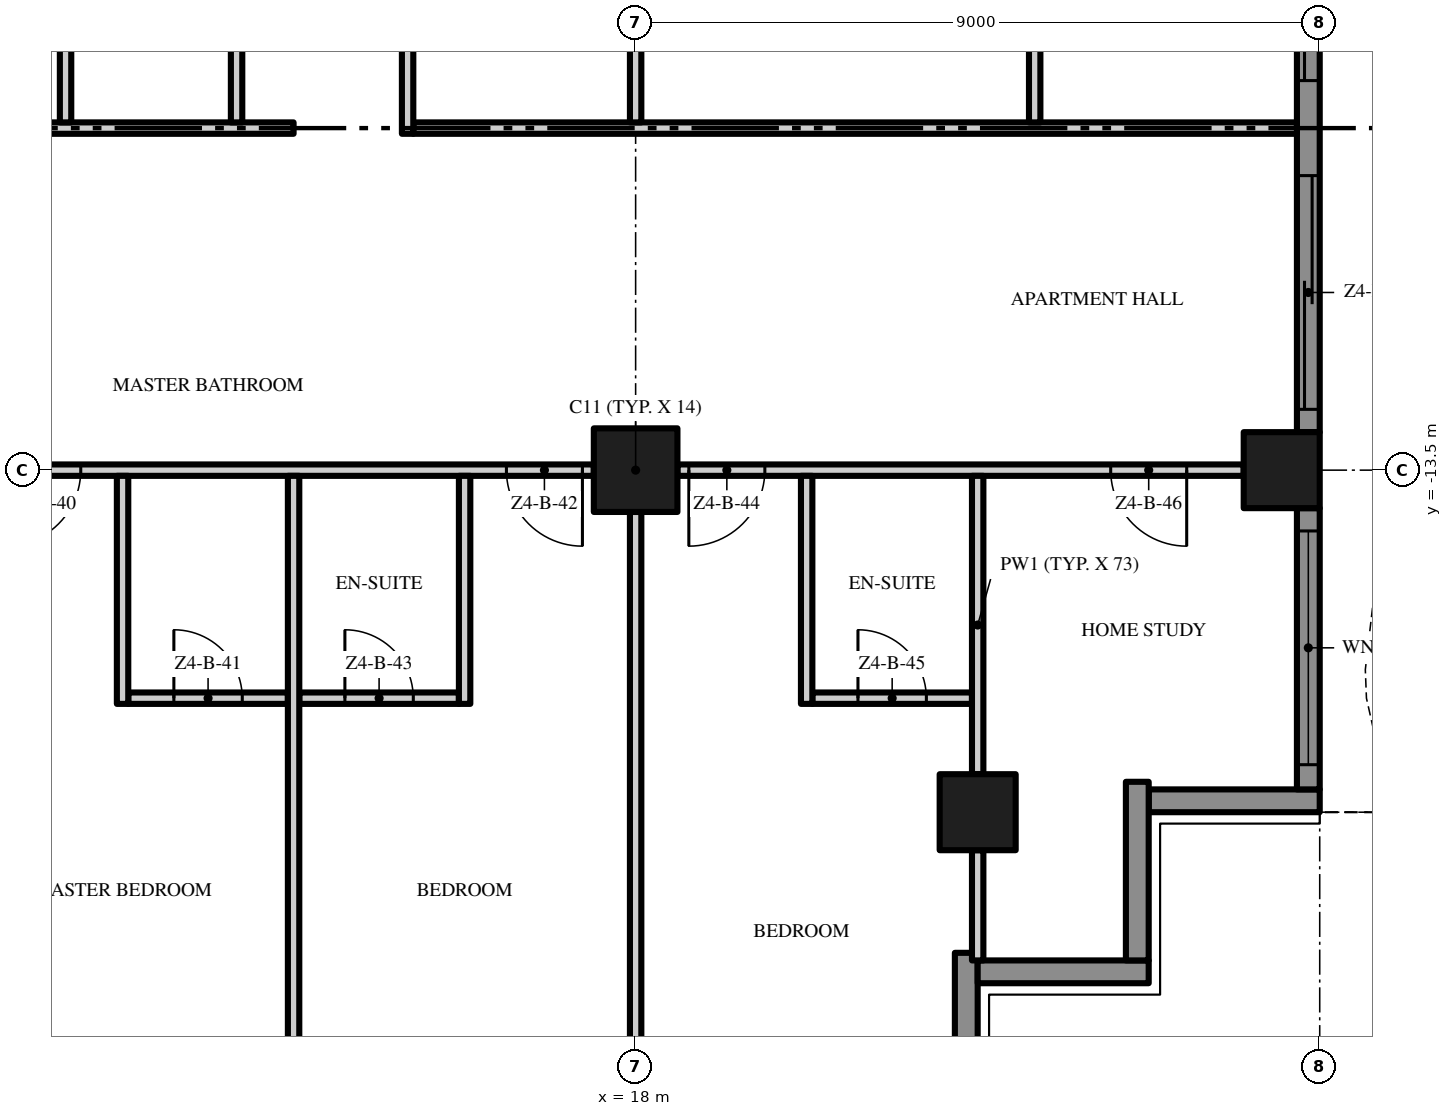
"""IFC4 building model, lengths in metres.
Left out: names, types, materials, properties, quantities, classifications, styles, units other than length and angle.
Written with IfcOpenShell. Run it as: python <this file> out.ifc"""

import sys

from ifc_helpers import new_model, si_unit, direction, frame, frame_2d, origin, origin_2d, place, context, subcontext, project, spatial, polyline, rectangle, outline, extrude, element, fill, save


model = new_model("IFC4")
c1 = context("Model", 3, precision=1e-05, world=origin(), true_north=direction((0.0, 1.0)))
c2 = subcontext(c1, "Body", "Model", "MODEL_VIEW")
j1 = project(units=[si_unit("LENGTHUNIT", "METRE"), si_unit("PLANEANGLEUNIT", "RADIAN")], contexts=[c1])
p1 = place(None, origin())
s1 = spatial("IfcSite", under=j1, at=p1, CompositionType="ELEMENT")
p2 = place(p1, origin())
s2 = spatial("IfcBuilding", under=s1, at=p2, CompositionType="ELEMENT")
p3 = place(p2, frame((0.0, 0.0, 199.6)))
s3 = spatial("IfcBuildingStorey", under=s2, at=p3, CompositionType="ELEMENT", Elevation=199.6)
p4 = place(p3, frame((18.0, -13.5, 0.0), z_axis=(0.0, 0.0, 1.0), x_axis=(1.0, 0.0, 0.0)))
e1 = element("IfcColumn", 1, at=p4, inside=s3, PredefinedType="COLUMN", context=c2, shape_type="SweptSolid", body=[
    extrude(rectangle(XDim=1.1, YDim=1.1, at=origin_2d()), origin(), (0.0, 0.0, 1.0), 3.5),
])
for number, where, z_axis, x_axis in (
    (2, (26.5, -13.5, 0.0), (0.0, 0.0, 1.0), (1.0, 0.0, 0.0)),
    (3, (22.5, -18.0, 0.0), (0.0, 0.0, 1.0), (1.0, 0.0, 0.0)),
):
    element("IfcColumn", number, at=place(p3, frame(where, z_axis=z_axis, x_axis=x_axis)), inside=s3, PredefinedType="COLUMN", context=c2, shape_type="SweptSolid", body=[
        extrude(rectangle(XDim=1.0, YDim=1.0, at=origin_2d()), origin(), (0.0, 0.0, 1.0), 3.5),
    ])
p5 = place(p3, frame((22.35, -19.85, 0.0), z_axis=(0.0, 0.0, 1.0), x_axis=(0.0, -1.0, 0.0)))
e4 = element("IfcWall", 4, at=p5, inside=s3, PredefinedType="SOLIDWALL", context=c2, shape_type="SweptSolid", body=[
    extrude(rectangle(XDim=2.35, YDim=0.3, at=frame_2d((1.175, 0.0))), origin(), (0.0, 0.0, 1.0), 3.5),
])
p6 = place(p3, frame((24.75, -20.1, 0.0), z_axis=(0.0, 0.0, 1.0), x_axis=(-1.0, 0.0, 0.0)))
e5 = element("IfcWall", 5, at=p6, inside=s3, PredefinedType="SOLIDWALL", context=c2, shape_type="SweptSolid", body=[
    extrude(rectangle(XDim=2.25, YDim=0.3, at=frame_2d((1.125, 0.0))), origin(), (0.0, 0.0, 1.0), 3.5),
])
p7 = place(p3, frame((24.6, -17.6, 0.0), z_axis=(0.0, 0.0, 1.0), x_axis=(0.0, -1.0, 0.0)))
e6 = element("IfcWall", 6, at=p7, inside=s3, PredefinedType="SOLIDWALL", context=c2, shape_type="SweptSolid", body=[
    extrude(rectangle(XDim=2.35, YDim=0.3, at=frame_2d((1.175, 0.0))), origin(), (0.0, 0.0, 1.0), 3.5),
])
p8 = place(p3, frame((27.0, -17.85, 0.0), z_axis=(0.0, 0.0, 1.0), x_axis=(-1.0, 0.0, 0.0)))
e7 = element("IfcWall", 7, at=p8, inside=s3, PredefinedType="SOLIDWALL", context=c2, shape_type="SweptSolid", body=[
    extrude(rectangle(XDim=2.25, YDim=0.3, at=frame_2d((1.125, 0.0))), origin(), (0.0, 0.0, 1.0), 3.5),
])
p9 = place(p3, frame((26.85, -14.0, 0.0), z_axis=(0.0, 0.0, 1.0), x_axis=(0.0, -1.0, 0.0)))
e8 = element("IfcWall", 8, at=p9, inside=s3, PredefinedType="SOLIDWALL", context=c2, shape_type="SweptSolid", body=[
    extrude(rectangle(XDim=3.7, YDim=0.3, at=frame_2d((1.85, 0.0))), origin(), (0.0, 0.0, 1.0), 3.5),
])
p10 = place(p9, frame((0.3, 0.0, 0.45)))
e9 = element("IfcOpeningElement", 9, at=p10, cuts=e8, PredefinedType="OPENING", context=c2, shape_type="SweptSolid", body=[
    extrude(rectangle(XDim=3.075, YDim=2.65, at=frame_2d((1.538, 1.325))), frame((0.0, 0.16, 0.0), z_axis=(0.0, -1.0, 0.0), x_axis=(1.0, 0.0, 0.0)), (0.0, 0.0, 1.0), 0.32),
])
p11 = place(p3, frame((26.85, -5.0, 0.0), z_axis=(0.0, 0.0, 1.0), x_axis=(0.0, -1.0, 0.0)))
e10 = element("IfcWall", 10, at=p11, inside=s3, PredefinedType="SOLIDWALL", context=c2, shape_type="SweptSolid", body=[
    extrude(rectangle(XDim=8.0, YDim=0.3, at=frame_2d((4.0, 0.0))), origin(), (0.0, 0.0, 1.0), 3.5),
])
p12 = place(p11, frame((4.625, 0.0, 0.0)))
e11 = element("IfcOpeningElement", 11, at=p12, cuts=e10, PredefinedType="OPENING", context=c2, shape_type="SweptSolid", body=[
    extrude(rectangle(XDim=3.075, YDim=2.4, at=frame_2d((1.538, 1.2))), frame((0.0, 0.16, 0.0), z_axis=(0.0, -1.0, 0.0), x_axis=(1.0, 0.0, 0.0)), (0.0, 0.0, 1.0), 0.32),
])
p13 = place(p11, frame((0.3, 0.0, 0.0)))
e12 = element("IfcOpeningElement", 12, at=p13, cuts=e10, PredefinedType="OPENING", context=c2, shape_type="SweptSolid", body=[
    extrude(rectangle(XDim=3.075, YDim=2.4, at=frame_2d((1.538, 1.2))), frame((0.0, 0.16, 0.0), z_axis=(0.0, -1.0, 0.0), x_axis=(1.0, 0.0, 0.0)), (0.0, 0.0, 1.0), 0.32),
])
p14 = place(p3, origin())
e13 = element("IfcWall", 13, at=p14, inside=s3, PredefinedType="USERDEFINED", context=c2, shape_type="SweptSolid", body=[
    extrude(outline(polyline([(27.951, -18.0), (27.615, -16.5), (27.6, -16.125), (27.731, -15.0), (28.255, -13.5), (28.988, -12.0), (29.649, -10.5), (29.985, -9.0), (30.0, -8.625), (29.869, -7.5), (29.345, -6.0), (28.612, -4.5), (27.951, -3.0), (27.615, -1.5), (27.6, -1.125), (27.731, 0.0), (28.255, 1.5), (28.988, 3.0), (29.649, 4.5), (29.985, 6.0), (30.0, 6.375), (29.869, 7.5), (29.345, 9.0), (28.612, 10.5), (27.951, 12.0), (27.615, 13.5), (27.6, 13.875), (27.731, 15.0), (28.255, 16.5), (28.988, 18.0), (28.763, 18.11), (28.024, 16.596), (27.486, 15.056), (27.349, 13.885), (27.366, 13.467), (27.713, 11.921), (28.385, 10.395), (29.114, 8.904), (29.624, 7.444), (29.749, 6.365), (29.736, 6.033), (29.41, 4.579), (28.761, 3.105), (28.024, 1.596), (27.486, 0.056), (27.349, -1.115), (27.366, -1.533), (27.713, -3.079), (28.385, -4.605), (29.114, -6.096), (29.624, -7.556), (29.749, -8.635), (29.736, -8.967), (29.41, -10.421), (28.761, -11.895), (28.024, -13.404), (27.486, -14.944), (27.349, -16.115), (27.366, -16.533), (27.708, -18.055), (27.951, -18.0)])), origin(), (0.0, 0.0, 1.0), 0.9),
])
p15 = place(p3, frame((11.325, -16.5, 0.0), z_axis=(0.0, 0.0, 1.0), x_axis=(1.0, 0.0, 0.0)))
e14 = element("IfcWall", 14, at=p15, inside=s3, PredefinedType="PARTITIONING", context=c2, shape_type="SweptSolid", body=[
    extrude(rectangle(XDim=2.1, YDim=0.15, at=frame_2d((1.05, 0.0))), origin(), (0.0, 0.0, 1.0), 3.5),
])
p16 = place(p15, frame((0.6, 0.0, 0.0)))
e15 = element("IfcOpeningElement", 15, at=p16, cuts=e14, PredefinedType="OPENING", context=c2, shape_type="SweptSolid", body=[
    extrude(rectangle(XDim=0.9, YDim=2.1, at=frame_2d((0.45, 1.05))), frame((0.0, 0.085, 0.0), z_axis=(0.0, -1.0, 0.0), x_axis=(1.0, 0.0, 0.0)), (0.0, 0.0, 1.0), 0.17),
])
p17 = place(p3, frame((13.575, -16.5, 0.0), z_axis=(0.0, 0.0, 1.0), x_axis=(1.0, 0.0, 0.0)))
e16 = element("IfcWall", 16, at=p17, inside=s3, PredefinedType="PARTITIONING", context=c2, shape_type="SweptSolid", body=[
    extrude(rectangle(XDim=2.1, YDim=0.15, at=frame_2d((1.05, 0.0))), origin(), (0.0, 0.0, 1.0), 3.5),
])
p18 = place(p17, frame((0.6, 0.0, 0.0)))
e17 = element("IfcOpeningElement", 17, at=p18, cuts=e16, PredefinedType="OPENING", context=c2, shape_type="SweptSolid", body=[
    extrude(rectangle(XDim=0.9, YDim=2.1, at=frame_2d((0.45, 1.05))), frame((0.0, 0.085, 0.0), z_axis=(0.0, -1.0, 0.0), x_axis=(1.0, 0.0, 0.0)), (0.0, 0.0, 1.0), 0.17),
])
p19 = place(p3, frame((20.325, -16.5, 0.0), z_axis=(0.0, 0.0, 1.0), x_axis=(1.0, 0.0, 0.0)))
e18 = element("IfcWall", 18, at=p19, inside=s3, PredefinedType="PARTITIONING", context=c2, shape_type="SweptSolid", body=[
    extrude(rectangle(XDim=2.1, YDim=0.15, at=frame_2d((1.05, 0.0))), origin(), (0.0, 0.0, 1.0), 3.5),
])
p20 = place(p19, frame((0.6, 0.0, 0.0)))
e19 = element("IfcOpeningElement", 19, at=p20, cuts=e18, PredefinedType="OPENING", context=c2, shape_type="SweptSolid", body=[
    extrude(rectangle(XDim=0.9, YDim=2.1, at=frame_2d((0.45, 1.05))), frame((0.0, 0.085, 0.0), z_axis=(0.0, -1.0, 0.0), x_axis=(1.0, 0.0, 0.0)), (0.0, 0.0, 1.0), 0.17),
])
p21 = place(p3, frame((17.45, -13.5, 0.0), z_axis=(0.0, 0.0, 1.0), x_axis=(-1.0, 0.0, 0.0)))
e20 = element("IfcWall", 20, at=p21, inside=s3, PredefinedType="PARTITIONING", context=c2, shape_type="SweptSolid", body=[
    extrude(rectangle(XDim=7.9, YDim=0.15, at=frame_2d((3.95, 0.0))), origin(), (0.0, 0.0, 1.0), 3.5),
])
p22 = place(p21, frame((6.75, 0.0, 0.0)))
e21 = element("IfcOpeningElement", 21, at=p22, cuts=e20, PredefinedType="OPENING", context=c2, shape_type="SweptSolid", body=[
    extrude(rectangle(XDim=1.0, YDim=2.4, at=frame_2d((0.5, 1.2))), frame((0.0, 0.085, 0.0), z_axis=(0.0, -1.0, 0.0), x_axis=(1.0, 0.0, 0.0)), (0.0, 0.0, 1.0), 0.17),
])
p23 = place(p21, frame((0.15, 0.0, 0.0)))
e22 = element("IfcOpeningElement", 22, at=p23, cuts=e20, PredefinedType="OPENING", context=c2, shape_type="SweptSolid", body=[
    extrude(rectangle(XDim=1.0, YDim=2.4, at=frame_2d((0.5, 1.2))), frame((0.0, 0.085, 0.0), z_axis=(0.0, -1.0, 0.0), x_axis=(1.0, 0.0, 0.0)), (0.0, 0.0, 1.0), 0.17),
])
p24 = place(p3, frame((26.0, -13.5, 0.0), z_axis=(0.0, 0.0, 1.0), x_axis=(-1.0, 0.0, 0.0)))
e23 = element("IfcWall", 23, at=p24, inside=s3, PredefinedType="PARTITIONING", context=c2, shape_type="SweptSolid", body=[
    extrude(rectangle(XDim=7.45, YDim=0.15, at=frame_2d((3.725, 0.0))), origin(), (0.0, 0.0, 1.0), 3.5),
])
p25 = place(p24, frame((6.3, 0.0, 0.0)))
e24 = element("IfcOpeningElement", 24, at=p25, cuts=e23, PredefinedType="OPENING", context=c2, shape_type="SweptSolid", body=[
    extrude(rectangle(XDim=1.0, YDim=2.4, at=frame_2d((0.5, 1.2))), frame((0.0, 0.085, 0.0), z_axis=(0.0, -1.0, 0.0), x_axis=(1.0, 0.0, 0.0)), (0.0, 0.0, 1.0), 0.17),
])
p26 = place(p24, frame((0.75, 0.0, 0.0)))
e25 = element("IfcOpeningElement", 25, at=p26, cuts=e23, PredefinedType="OPENING", context=c2, shape_type="SweptSolid", body=[
    extrude(rectangle(XDim=1.0, YDim=2.4, at=frame_2d((0.5, 1.2))), frame((0.0, 0.085, 0.0), z_axis=(0.0, -1.0, 0.0), x_axis=(1.0, 0.0, 0.0)), (0.0, 0.0, 1.0), 0.17),
])
p27 = place(p3, frame((0.1, -9.0, 0.0), z_axis=(0.0, 0.0, 1.0), x_axis=(1.0, 0.0, 0.0)))
e26 = element("IfcWall", 26, at=p27, inside=s3, PredefinedType="PARTITIONING", context=c2, shape_type="SweptSolid", body=[
    extrude(rectangle(XDim=13.4, YDim=0.15, at=frame_2d((6.7, 0.0))), origin(), (0.0, 0.0, 1.0), 3.5),
])
p28 = place(p27, frame((6.9, 0.0, 0.0)))
e27 = element("IfcOpeningElement", 27, at=p28, cuts=e26, PredefinedType="OPENING", context=c2, shape_type="SweptSolid", body=[
    extrude(rectangle(XDim=1.0, YDim=2.4, at=frame_2d((0.5, 1.2))), frame((0.0, 0.085, 0.0), z_axis=(0.0, -1.0, 0.0), x_axis=(1.0, 0.0, 0.0)), (0.0, 0.0, 1.0), 0.17),
])
p29 = place(p3, frame((15.075, -9.0, 0.0), z_axis=(0.0, 0.0, 1.0), x_axis=(1.0, 0.0, 0.0)))
e28 = element("IfcWall", 28, at=p29, inside=s3, PredefinedType="PARTITIONING", context=c2, shape_type="SweptSolid", body=[
    extrude(rectangle(XDim=11.625, YDim=0.15, at=frame_2d((5.812, 0.0))), origin(), (0.0, 0.0, 1.0), 3.5),
])
p30 = place(p3, frame((10.5, -8.925, 0.0), z_axis=(0.0, 0.0, 1.0), x_axis=(0.0, 1.0, 0.0)))
e29 = element("IfcWall", 29, at=p30, inside=s3, PredefinedType="PARTITIONING", context=c2, shape_type="SweptSolid", body=[
    extrude(rectangle(XDim=4.35, YDim=0.15, at=frame_2d((2.175, 0.0))), origin(), (0.0, 0.0, 1.0), 3.5),
])
p31 = place(p3, frame((11.25, -16.575, 0.0), z_axis=(0.0, 0.0, 1.0), x_axis=(0.0, 1.0, 0.0)))
e30 = element("IfcWall", 30, at=p31, inside=s3, PredefinedType="PARTITIONING", context=c2, shape_type="SweptSolid", body=[
    extrude(rectangle(XDim=3.0, YDim=0.15, at=frame_2d((1.5, 0.0))), origin(), (0.0, 0.0, 1.0), 3.5),
])
p32 = place(p3, frame((12.75, -8.925, 0.0), z_axis=(0.0, 0.0, 1.0), x_axis=(0.0, 1.0, 0.0)))
e31 = element("IfcWall", 31, at=p32, inside=s3, PredefinedType="PARTITIONING", context=c2, shape_type="SweptSolid", body=[
    extrude(rectangle(XDim=4.5, YDim=0.15, at=frame_2d((2.25, 0.0))), origin(), (0.0, 0.0, 1.0), 3.5),
])
p33 = place(p32, frame((1.75, 0.0, 0.0)))
e32 = element("IfcOpeningElement", 32, at=p33, cuts=e31, PredefinedType="OPENING", context=c2, shape_type="SweptSolid", body=[
    extrude(rectangle(XDim=0.9, YDim=2.1, at=frame_2d((0.45, 1.05))), frame((0.0, 0.085, 0.0), z_axis=(0.0, -1.0, 0.0), x_axis=(1.0, 0.0, 0.0)), (0.0, 0.0, 1.0), 0.17),
])
p34 = place(p3, frame((13.5, -22.2, 0.0), z_axis=(0.0, 0.0, 1.0), x_axis=(0.0, 1.0, 0.0)))
e33 = element("IfcWall", 33, at=p34, inside=s3, PredefinedType="PARTITIONING", context=c2, shape_type="SweptSolid", body=[
    extrude(rectangle(XDim=8.625, YDim=0.15, at=frame_2d((4.312, 0.0))), origin(), (0.0, 0.0, 1.0), 3.5),
])
p35 = place(p3, frame((15.0, -9.075, 0.0), z_axis=(0.0, 0.0, 1.0), x_axis=(0.0, 1.0, 0.0)))
e34 = element("IfcWall", 34, at=p35, inside=s3, PredefinedType="PARTITIONING", context=c2, shape_type="SweptSolid", body=[
    extrude(rectangle(XDim=4.65, YDim=0.15, at=frame_2d((2.325, 0.0))), origin(), (0.0, 0.0, 1.0), 3.5),
])
p36 = place(p3, frame((15.75, -16.575, 0.0), z_axis=(0.0, 0.0, 1.0), x_axis=(0.0, 1.0, 0.0)))
e35 = element("IfcWall", 35, at=p36, inside=s3, PredefinedType="PARTITIONING", context=c2, shape_type="SweptSolid", body=[
    extrude(rectangle(XDim=3.0, YDim=0.15, at=frame_2d((1.5, 0.0))), origin(), (0.0, 0.0, 1.0), 3.5),
])
p37 = place(p3, frame((18.0, -21.5, 0.0), z_axis=(0.0, 0.0, 1.0), x_axis=(0.0, 1.0, 0.0)))
e36 = element("IfcWall", 36, at=p37, inside=s3, PredefinedType="PARTITIONING", context=c2, shape_type="SweptSolid", body=[
    extrude(rectangle(XDim=7.45, YDim=0.15, at=frame_2d((3.725, 0.0))), origin(), (0.0, 0.0, 1.0), 3.5),
])
p38 = place(p3, frame((18.0, -8.925, 0.0), z_axis=(0.0, 0.0, 1.0), x_axis=(0.0, 1.0, 0.0)))
e37 = element("IfcWall", 37, at=p38, inside=s3, PredefinedType="PARTITIONING", context=c2, shape_type="SweptSolid", body=[
    extrude(rectangle(XDim=3.875, YDim=0.15, at=frame_2d((1.938, 0.0))), origin(), (0.0, 0.0, 1.0), 3.5),
])
p39 = place(p3, frame((20.25, -16.575, 0.0), z_axis=(0.0, 0.0, 1.0), x_axis=(0.0, 1.0, 0.0)))
e38 = element("IfcWall", 38, at=p39, inside=s3, PredefinedType="PARTITIONING", context=c2, shape_type="SweptSolid", body=[
    extrude(rectangle(XDim=3.0, YDim=0.15, at=frame_2d((1.5, 0.0))), origin(), (0.0, 0.0, 1.0), 3.5),
])
p40 = place(p3, frame((22.5, -19.95, 0.0), z_axis=(0.0, 0.0, 1.0), x_axis=(0.0, 1.0, 0.0)))
e39 = element("IfcWall", 39, at=p40, inside=s3, PredefinedType="PARTITIONING", context=c2, shape_type="SweptSolid", body=[
    extrude(rectangle(XDim=1.45, YDim=0.15, at=frame_2d((0.725, 0.0))), origin(), (0.0, 0.0, 1.0), 3.5),
])
p41 = place(p3, frame((22.5, -17.5, 0.0), z_axis=(0.0, 0.0, 1.0), x_axis=(0.0, 1.0, 0.0)))
e40 = element("IfcWall", 40, at=p41, inside=s3, PredefinedType="PARTITIONING", context=c2, shape_type="SweptSolid", body=[
    extrude(rectangle(XDim=3.925, YDim=0.15, at=frame_2d((1.962, 0.0))), origin(), (0.0, 0.0, 1.0), 3.5),
])
p42 = place(p3, frame((23.25, -4.575, 0.0), z_axis=(0.0, 0.0, 1.0), x_axis=(0.0, -1.0, 0.0)))
e41 = element("IfcWall", 41, at=p42, inside=s3, PredefinedType="PARTITIONING", context=c2, shape_type="SweptSolid", body=[
    extrude(rectangle(XDim=4.35, YDim=0.15, at=frame_2d((2.175, 0.0))), origin(), (0.0, 0.0, 1.0), 3.5),
])
p43 = place(p42, frame((1.7, 0.0, 0.0)))
e42 = element("IfcOpeningElement", 42, at=p43, cuts=e41, PredefinedType="OPENING", context=c2, shape_type="SweptSolid", body=[
    extrude(rectangle(XDim=0.9, YDim=2.1, at=frame_2d((0.45, 1.05))), frame((0.0, 0.085, 0.0), z_axis=(0.0, -1.0, 0.0), x_axis=(1.0, 0.0, 0.0)), (0.0, 0.0, 1.0), 0.17),
])
p44 = place(p10, origin())
e43 = element("IfcWindow", 43, at=p44, inside=s3, PartitioningType="SINGLE_PANEL", PredefinedType="WINDOW", context=c2, shape_type="SweptSolid", body=[
    extrude(rectangle(XDim=3.075, YDim=2.65, at=frame_2d((1.538, 1.325))), frame((0.0, 0.03, 0.0), z_axis=(0.0, -1.0, 0.0), x_axis=(1.0, 0.0, 0.0)), (0.0, 0.0, 1.0), 0.06),
])
fill(e9, e43)
p45 = place(p12, origin())
e44 = element("IfcDoor", 44, at=p45, inside=s3, OperationType="SINGLE_SWING_LEFT", PredefinedType="DOOR", context=c2, shape_type="SweptSolid", body=[
    extrude(rectangle(XDim=3.075, YDim=2.4, at=frame_2d((1.538, 1.2))), frame((0.0, 0.025, 0.0), z_axis=(0.0, -1.0, 0.0), x_axis=(1.0, 0.0, 0.0)), (0.0, 0.0, 1.0), 0.05),
])
fill(e11, e44)
p46 = place(p13, origin())
e45 = element("IfcDoor", 45, at=p46, inside=s3, OperationType="SINGLE_SWING_LEFT", PredefinedType="DOOR", context=c2, shape_type="SweptSolid", body=[
    extrude(rectangle(XDim=3.075, YDim=2.4, at=frame_2d((1.538, 1.2))), frame((0.0, 0.025, 0.0), z_axis=(0.0, -1.0, 0.0), x_axis=(1.0, 0.0, 0.0)), (0.0, 0.0, 1.0), 0.05),
])
fill(e12, e45)
p47 = place(p22, origin())
e46 = element("IfcDoor", 46, at=p47, inside=s3, OperationType="SINGLE_SWING_RIGHT", PredefinedType="DOOR", context=c2, shape_type="SweptSolid", body=[
    extrude(rectangle(XDim=1.0, YDim=2.4, at=frame_2d((0.5, 1.2))), frame((0.0, 0.025, 0.0), z_axis=(0.0, -1.0, 0.0), x_axis=(1.0, 0.0, 0.0)), (0.0, 0.0, 1.0), 0.05),
])
fill(e21, e46)
p48 = place(p16, origin())
e47 = element("IfcDoor", 47, at=p48, inside=s3, OperationType="SINGLE_SWING_LEFT", PredefinedType="DOOR", context=c2, shape_type="SweptSolid", body=[
    extrude(rectangle(XDim=0.9, YDim=2.1, at=frame_2d((0.45, 1.05))), frame((0.0, 0.025, 0.0), z_axis=(0.0, -1.0, 0.0), x_axis=(1.0, 0.0, 0.0)), (0.0, 0.0, 1.0), 0.05),
])
fill(e15, e47)
p49 = place(p23, origin())
e48 = element("IfcDoor", 48, at=p49, inside=s3, OperationType="SINGLE_SWING_LEFT", PredefinedType="DOOR", context=c2, shape_type="SweptSolid", body=[
    extrude(rectangle(XDim=1.0, YDim=2.4, at=frame_2d((0.5, 1.2))), frame((0.0, 0.025, 0.0), z_axis=(0.0, -1.0, 0.0), x_axis=(1.0, 0.0, 0.0)), (0.0, 0.0, 1.0), 0.05),
])
fill(e22, e48)
p50 = place(p18, origin())
e49 = element("IfcDoor", 49, at=p50, inside=s3, OperationType="SINGLE_SWING_LEFT", PredefinedType="DOOR", context=c2, shape_type="SweptSolid", body=[
    extrude(rectangle(XDim=0.9, YDim=2.1, at=frame_2d((0.45, 1.05))), frame((0.0, 0.025, 0.0), z_axis=(0.0, -1.0, 0.0), x_axis=(1.0, 0.0, 0.0)), (0.0, 0.0, 1.0), 0.05),
])
fill(e17, e49)
p51 = place(p25, origin())
e50 = element("IfcDoor", 50, at=p51, inside=s3, OperationType="SINGLE_SWING_RIGHT", PredefinedType="DOOR", context=c2, shape_type="SweptSolid", body=[
    extrude(rectangle(XDim=1.0, YDim=2.4, at=frame_2d((0.5, 1.2))), frame((0.0, 0.025, 0.0), z_axis=(0.0, -1.0, 0.0), x_axis=(1.0, 0.0, 0.0)), (0.0, 0.0, 1.0), 0.05),
])
fill(e24, e50)
p52 = place(p20, origin())
e51 = element("IfcDoor", 51, at=p52, inside=s3, OperationType="SINGLE_SWING_LEFT", PredefinedType="DOOR", context=c2, shape_type="SweptSolid", body=[
    extrude(rectangle(XDim=0.9, YDim=2.1, at=frame_2d((0.45, 1.05))), frame((0.0, 0.025, 0.0), z_axis=(0.0, -1.0, 0.0), x_axis=(1.0, 0.0, 0.0)), (0.0, 0.0, 1.0), 0.05),
])
fill(e19, e51)
p53 = place(p26, origin())
e52 = element("IfcDoor", 52, at=p53, inside=s3, OperationType="SINGLE_SWING_LEFT", PredefinedType="DOOR", context=c2, shape_type="SweptSolid", body=[
    extrude(rectangle(XDim=1.0, YDim=2.4, at=frame_2d((0.5, 1.2))), frame((0.0, 0.025, 0.0), z_axis=(0.0, -1.0, 0.0), x_axis=(1.0, 0.0, 0.0)), (0.0, 0.0, 1.0), 0.05),
])
fill(e25, e52)
save(model, sys.argv[1])
